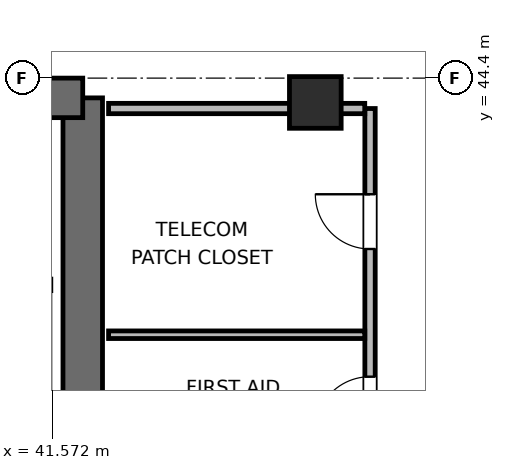
"""IFC4 building model, lengths in metres.
Left out: names, types, materials, properties, quantities, classifications, styles, units other than length and angle.
Written with IfcOpenShell. Run it as: python <this file> out.ifc"""

import sys

from ifc_helpers import new_model, si_unit, direction, frame, frame_2d, origin, origin_2d, place, context, subcontext, project, spatial, rectangle, extrude, element, fill, save


model = new_model("IFC4")
c1 = context("Model", 3, precision=1e-05, world=origin(), true_north=direction((0.0, 1.0)))
c2 = subcontext(c1, "Body", "Model", "MODEL_VIEW")
j1 = project(units=[si_unit("LENGTHUNIT", "METRE"), si_unit("PLANEANGLEUNIT", "RADIAN")], contexts=[c1])
p1 = place(None, origin())
s1 = spatial("IfcSite", under=j1, at=p1, CompositionType="ELEMENT")
p2 = place(p1, origin())
s2 = spatial("IfcBuilding", under=s1, at=p2, CompositionType="ELEMENT")
p3 = place(p2, frame((0.0, 0.0, 251.1)))
s3 = spatial("IfcBuildingStorey", under=s2, at=p3, CompositionType="ELEMENT", Elevation=251.1)
p4 = place(p3, frame((42.075, 37.8, 0.0), z_axis=(0.0, 0.0, 1.0), x_axis=(0.0, 1.0, 0.0)))
e1 = element("IfcWall", 1, at=p4, inside=s3, PredefinedType="SHEAR", context=c2, shape_type="SweptSolid", body=[
    extrude(rectangle(XDim=6.275, YDim=0.65, at=frame_2d((3.137, 0.0))), origin(), (0.0, 0.0, 1.0), 3.9),
])
p5 = place(p3, frame((32.725, 44.075, 0.0), z_axis=(0.0, 0.0, 1.0), x_axis=(1.0, 0.0, 0.0)))
e2 = element("IfcWall", 2, at=p5, inside=s3, PredefinedType="SHEAR", context=c2, shape_type="SweptSolid", body=[
    extrude(rectangle(XDim=9.35, YDim=0.65, at=frame_2d((4.675, 0.0))), origin(), (0.0, 0.0, 1.0), 3.9),
])
p6 = place(p5, frame((1.025, 0.0, 0.0)))
e3 = element("IfcOpeningElement", 3, at=p6, cuts=e2, PredefinedType="OPENING", context=c2, shape_type="SweptSolid", body=[
    extrude(rectangle(XDim=0.95, YDim=2.04, at=frame_2d((0.475, 1.02))), frame((0.0, 0.335, 0.0), z_axis=(0.0, -1.0, 0.0), x_axis=(1.0, 0.0, 0.0)), (0.0, 0.0, 1.0), 0.67),
])
p7 = place(p5, frame((4.275, 0.0, 0.0)))
e4 = element("IfcOpeningElement", 4, at=p7, cuts=e2, PredefinedType="OPENING", context=c2, shape_type="SweptSolid", body=[
    extrude(rectangle(XDim=0.9, YDim=2.02, at=frame_2d((0.45, 1.01))), frame((0.0, 0.335, 0.0), z_axis=(0.0, -1.0, 0.0), x_axis=(1.0, 0.0, 0.0)), (0.0, 0.0, 1.0), 0.67),
])
p8 = place(p5, frame((7.175, 0.0, 0.0)))
e5 = element("IfcOpeningElement", 5, at=p8, cuts=e2, PredefinedType="OPENING", context=c2, shape_type="SweptSolid", body=[
    extrude(rectangle(XDim=0.9, YDim=2.02, at=frame_2d((0.45, 1.01))), frame((0.0, 0.335, 0.0), z_axis=(0.0, -1.0, 0.0), x_axis=(1.0, 0.0, 0.0)), (0.0, 0.0, 1.0), 0.67),
])
p9 = place(p3, frame((45.9, 44.0, 0.0), z_axis=(0.0, 0.0, 1.0), x_axis=(1.0, 0.0, 0.0)))
e6 = element("IfcColumn", 6, at=p9, inside=s3, PredefinedType="COLUMN", context=c2, shape_type="SweptSolid", body=[
    extrude(rectangle(XDim=0.85, YDim=0.85, at=origin_2d()), origin(), (0.0, 0.0, 1.0), 3.9),
])
p10 = place(p3, frame((46.8, 37.9, 0.0), z_axis=(0.0, 0.0, 1.0), x_axis=(0.0, 1.0, 0.0)))
e7 = element("IfcWall", 7, at=p10, inside=s3, PredefinedType="PARTITIONING", context=c2, shape_type="SweptSolid", body=[
    extrude(rectangle(XDim=6.0, YDim=0.17, at=frame_2d((3.0, 0.0))), origin(), (0.0, 0.0, 1.0), 3.68),
])
p11 = place(p10, frame((0.69, 0.0, 0.0)))
e8 = element("IfcOpeningElement", 8, at=p11, cuts=e7, PredefinedType="OPENING", context=c2, shape_type="SweptSolid", body=[
    extrude(rectangle(XDim=0.9, YDim=2.02, at=frame_2d((0.45, 1.01))), frame((0.0, 0.095, 0.0), z_axis=(0.0, -1.0, 0.0), x_axis=(1.0, 0.0, 0.0)), (0.0, 0.0, 1.0), 0.19),
])
p12 = place(p10, frame((3.69, 0.0, 0.0)))
e9 = element("IfcOpeningElement", 9, at=p12, cuts=e7, PredefinedType="OPENING", context=c2, shape_type="SweptSolid", body=[
    extrude(rectangle(XDim=0.9, YDim=2.02, at=frame_2d((0.45, 1.01))), frame((0.0, 0.095, 0.0), z_axis=(0.0, -1.0, 0.0), x_axis=(1.0, 0.0, 0.0)), (0.0, 0.0, 1.0), 0.19),
])
p13 = place(p3, frame((42.5, 43.9, 0.0), z_axis=(0.0, 0.0, 1.0), x_axis=(1.0, 0.0, 0.0)))
e10 = element("IfcWall", 10, at=p13, inside=s3, PredefinedType="PARTITIONING", context=c2, shape_type="SweptSolid", body=[
    extrude(rectangle(XDim=4.213, YDim=0.17, at=frame_2d((2.106, 0.0))), origin(), (0.0, 0.0, 1.0), 2.765),
])
p14 = place(p3, frame((42.5, 40.18, 0.0), z_axis=(0.0, 0.0, 1.0), x_axis=(1.0, 0.0, 0.0)))
e11 = element("IfcWall", 11, at=p14, inside=s3, PredefinedType="PARTITIONING", context=c2, shape_type="SweptSolid", body=[
    extrude(rectangle(XDim=4.213, YDim=0.125, at=frame_2d((2.106, 0.0))), origin(), (0.0, 0.0, 1.0), 3.68),
])
p15 = place(p11, origin())
e12 = element("IfcDoor", 12, at=p15, inside=s3, OperationType="SINGLE_SWING_LEFT", PredefinedType="DOOR", context=c2, shape_type="SweptSolid", body=[
    extrude(rectangle(XDim=0.9, YDim=2.02, at=frame_2d((0.45, 1.01))), frame((0.0, 0.025, 0.0), z_axis=(0.0, -1.0, 0.0), x_axis=(1.0, 0.0, 0.0)), (0.0, 0.0, 1.0), 0.05),
])
fill(e8, e12)
p16 = place(p12, origin())
e13 = element("IfcDoor", 13, at=p16, inside=s3, OperationType="SINGLE_SWING_RIGHT", PredefinedType="DOOR", context=c2, shape_type="SweptSolid", body=[
    extrude(rectangle(XDim=0.9, YDim=2.02, at=frame_2d((0.45, 1.01))), frame((0.0, 0.025, 0.0), z_axis=(0.0, -1.0, 0.0), x_axis=(1.0, 0.0, 0.0)), (0.0, 0.0, 1.0), 0.05),
])
fill(e9, e13)
save(model, sys.argv[1])
